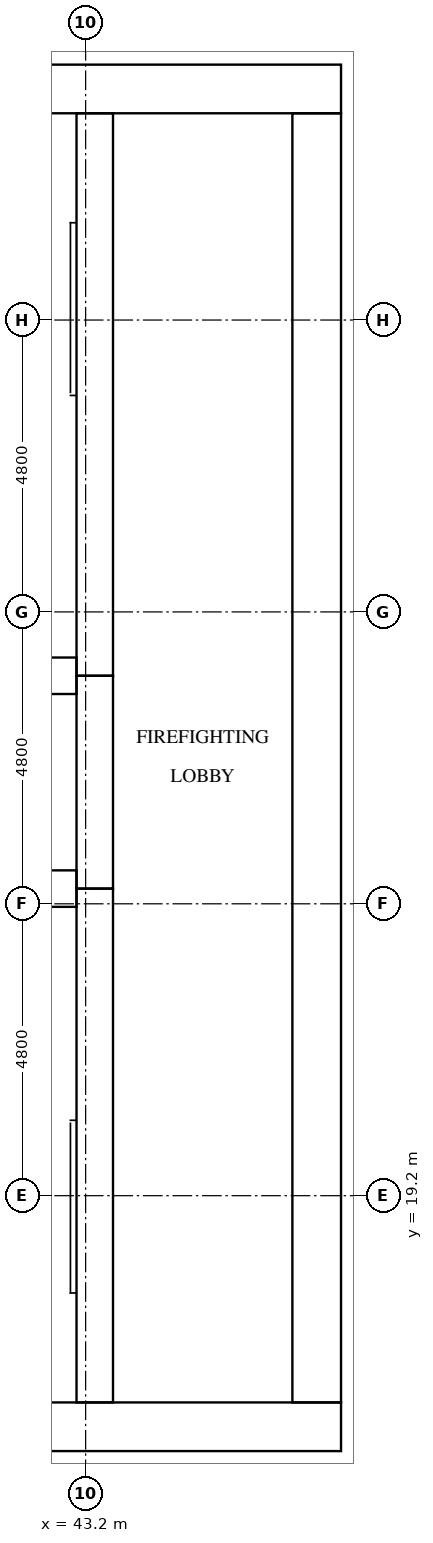
"""IFC4 building model, lengths in metres.
Left out: names, types, materials, properties, quantities, classifications, styles, units other than length and angle.
Written with IfcOpenShell. Run it as: python <this file> out.ifc"""

import sys

from ifc_helpers import new_model, si_unit, direction, frame, frame_2d, origin, place, context, subcontext, project, spatial, rectangle, extrude, element, fill, save


model = new_model("IFC4")
c1 = context("Model", 3, precision=1e-05, world=origin(), true_north=direction((0.0, 1.0)))
c2 = subcontext(c1, "Body", "Model", "MODEL_VIEW")
j1 = project(units=[si_unit("LENGTHUNIT", "METRE"), si_unit("PLANEANGLEUNIT", "RADIAN")], contexts=[c1])
p1 = place(None, origin())
s1 = spatial("IfcSite", under=j1, at=p1, CompositionType="ELEMENT")
p2 = place(p1, origin())
s2 = spatial("IfcBuilding", under=s1, at=p2, CompositionType="ELEMENT")
p3 = place(p2, frame((0.0, 0.0, 136.6)))
s3 = spatial("IfcBuildingStorey", under=s2, at=p3, CompositionType="ELEMENT", Elevation=136.6)
p4 = place(p3, frame((15.0, 15.4, 0.0), z_axis=(0.0, 0.0, 1.0), x_axis=(1.0, 0.0, 0.0)))
e1 = element("IfcWall", 1, at=p4, inside=s3, PredefinedType="SHEAR", context=c2, shape_type="SweptSolid", body=[
    extrude(rectangle(XDim=32.4, YDim=0.8, at=frame_2d((16.2, 0.0))), origin(), (0.0, 0.0, 1.0), 3.2),
])
p5 = place(p4, frame((15.3, 0.0, 0.0)))
e2 = element("IfcOpeningElement", 2, at=p5, cuts=e1, PredefinedType="OPENING", context=c2, shape_type="SweptSolid", body=[
    extrude(rectangle(XDim=1.8, YDim=2.1, at=frame_2d((0.9, 1.05))), frame((0.0, 0.41, 0.0), z_axis=(0.0, -1.0, 0.0), x_axis=(1.0, 0.0, 0.0)), (0.0, 0.0, 1.0), 0.82),
])
p6 = place(p3, frame((15.0, 37.4, 0.0), z_axis=(0.0, 0.0, 1.0), x_axis=(1.0, 0.0, 0.0)))
e3 = element("IfcWall", 3, at=p6, inside=s3, PredefinedType="SHEAR", context=c2, shape_type="SweptSolid", body=[
    extrude(rectangle(XDim=32.4, YDim=0.8, at=frame_2d((16.2, 0.0))), origin(), (0.0, 0.0, 1.0), 3.2),
])
p7 = place(p6, frame((15.3, 0.0, 0.0)))
e4 = element("IfcOpeningElement", 4, at=p7, cuts=e3, PredefinedType="OPENING", context=c2, shape_type="SweptSolid", body=[
    extrude(rectangle(XDim=1.8, YDim=2.1, at=frame_2d((0.9, 1.05))), frame((0.0, 0.41, 0.0), z_axis=(0.0, -1.0, 0.0), x_axis=(1.0, 0.0, 0.0)), (0.0, 0.0, 1.0), 0.82),
])
p8 = place(p6, frame((1.51, 0.0, 0.0)))
e5 = element("IfcOpeningElement", 5, at=p8, cuts=e3, PredefinedType="OPENING", context=c2, shape_type="SweptSolid", body=[
    extrude(rectangle(XDim=1.0, YDim=2.1, at=frame_2d((0.5, 1.05))), frame((0.0, 0.41, 0.0), z_axis=(0.0, -1.0, 0.0), x_axis=(1.0, 0.0, 0.0)), (0.0, 0.0, 1.0), 0.82),
])
p9 = place(p6, frame((5.11, 0.0, 0.0)))
e6 = element("IfcOpeningElement", 6, at=p9, cuts=e3, PredefinedType="OPENING", context=c2, shape_type="SweptSolid", body=[
    extrude(rectangle(XDim=1.0, YDim=2.1, at=frame_2d((0.5, 1.05))), frame((0.0, 0.41, 0.0), z_axis=(0.0, -1.0, 0.0), x_axis=(1.0, 0.0, 0.0)), (0.0, 0.0, 1.0), 0.82),
])
p10 = place(p3, frame((47.0, 15.8, 0.0), z_axis=(0.0, 0.0, 1.0), x_axis=(0.0, 1.0, 0.0)))
e7 = element("IfcWall", 7, at=p10, inside=s3, PredefinedType="SHEAR", context=c2, shape_type="SweptSolid", body=[
    extrude(rectangle(XDim=21.2, YDim=0.8, at=frame_2d((10.6, 0.0))), origin(), (0.0, 0.0, 1.0), 3.2),
])
p11 = place(p10, frame((10.3, 0.0, 0.0)))
e8 = element("IfcOpeningElement", 8, at=p11, cuts=e7, PredefinedType="OPENING", context=c2, shape_type="SweptSolid", body=[
    extrude(rectangle(XDim=1.2, YDim=2.1, at=frame_2d((0.6, 1.05))), frame((0.0, 0.41, 0.0), z_axis=(0.0, -1.0, 0.0), x_axis=(1.0, 0.0, 0.0)), (0.0, 0.0, 1.0), 0.82),
])
p12 = place(p3, frame((43.35, 15.8, 0.0), z_axis=(0.0, 0.0, 1.0), x_axis=(0.0, 1.0, 0.0)))
e9 = element("IfcWall", 9, at=p12, inside=s3, PredefinedType="SHEAR", context=c2, shape_type="SweptSolid", body=[
    extrude(rectangle(XDim=8.45, YDim=0.6, at=frame_2d((4.225, 0.0))), origin(), (0.0, 0.0, 1.0), 3.2),
])
p13 = place(p12, frame((0.4, 0.0, 0.0)))
e10 = element("IfcOpeningElement", 10, at=p13, cuts=e9, PredefinedType="OPENING", context=c2, shape_type="SweptSolid", body=[
    extrude(rectangle(XDim=1.2, YDim=2.1, at=frame_2d((0.6, 1.05))), frame((0.0, 0.31, 0.0), z_axis=(0.0, -1.0, 0.0), x_axis=(1.0, 0.0, 0.0)), (0.0, 0.0, 1.0), 0.62),
])
p14 = place(p3, frame((43.35, 24.25, 0.0), z_axis=(0.0, 0.0, 1.0), x_axis=(0.0, 1.0, 0.0)))
e11 = element("IfcWall", 11, at=p14, inside=s3, PredefinedType="SHEAR", context=c2, shape_type="SweptSolid", body=[
    extrude(rectangle(XDim=3.5, YDim=0.6, at=frame_2d((1.75, 0.0))), origin(), (0.0, 0.0, 1.0), 3.2),
])
p15 = place(p14, frame((1.2, 0.0, 0.0)))
e12 = element("IfcOpeningElement", 12, at=p15, cuts=e11, PredefinedType="OPENING", context=c2, shape_type="SweptSolid", body=[
    extrude(rectangle(XDim=1.1, YDim=2.1, at=frame_2d((0.55, 1.05))), frame((0.0, 0.31, 0.0), z_axis=(0.0, -1.0, 0.0), x_axis=(1.0, 0.0, 0.0)), (0.0, 0.0, 1.0), 0.62),
])
p16 = place(p3, frame((43.35, 27.75, 0.0), z_axis=(0.0, 0.0, 1.0), x_axis=(0.0, 1.0, 0.0)))
e13 = element("IfcWall", 13, at=p16, inside=s3, PredefinedType="SHEAR", context=c2, shape_type="SweptSolid", body=[
    extrude(rectangle(XDim=9.25, YDim=0.6, at=frame_2d((4.625, 0.0))), origin(), (0.0, 0.0, 1.0), 3.2),
])
p17 = place(p16, frame((7.65, 0.0, 0.0)))
e14 = element("IfcOpeningElement", 14, at=p17, cuts=e13, PredefinedType="OPENING", context=c2, shape_type="SweptSolid", body=[
    extrude(rectangle(XDim=1.2, YDim=2.1, at=frame_2d((0.6, 1.05))), frame((0.0, 0.31, 0.0), z_axis=(0.0, -1.0, 0.0), x_axis=(1.0, 0.0, 0.0)), (0.0, 0.0, 1.0), 0.62),
])
for number, where, z_axis, x_axis in (
    (15, (39.6, 24.25, 0.0), (0.0, 0.0, 1.0), (1.0, 0.0, 0.0)),
    (16, (39.6, 27.75, 0.0), (0.0, 0.0, 1.0), (1.0, 0.0, 0.0)),
):
    element("IfcWall", number, at=place(p3, frame(where, z_axis=z_axis, x_axis=x_axis)), inside=s3, PredefinedType="SHEAR", context=c2, shape_type="SweptSolid", body=[
        extrude(rectangle(XDim=3.45, YDim=0.6, at=frame_2d((1.725, 0.0))), origin(), (0.0, 0.0, 1.0), 3.2),
    ])
p18 = place(p15, origin())
e17 = element("IfcDoor", 17, at=p18, inside=s3, OperationType="DOUBLE_DOOR_SLIDING", PredefinedType="DOOR", context=c2, shape_type="SweptSolid", body=[
    extrude(rectangle(XDim=1.1, YDim=2.1, at=frame_2d((0.55, 1.05))), frame((0.0, 0.025, 0.0), z_axis=(0.0, -1.0, 0.0), x_axis=(1.0, 0.0, 0.0)), (0.0, 0.0, 1.0), 0.05),
])
fill(e12, e17)
p19 = place(p13, origin())
e18 = element("IfcDoor", 18, at=p19, inside=s3, OperationType="SINGLE_SWING_RIGHT", PredefinedType="DOOR", context=c2, shape_type="SweptSolid", body=[
    extrude(rectangle(XDim=1.2, YDim=2.1, at=frame_2d((0.6, 1.05))), frame((0.0, 0.025, 0.0), z_axis=(0.0, -1.0, 0.0), x_axis=(1.0, 0.0, 0.0)), (0.0, 0.0, 1.0), 0.05),
])
fill(e10, e18)
p20 = place(p17, origin())
e19 = element("IfcDoor", 19, at=p20, inside=s3, OperationType="SINGLE_SWING_LEFT", PredefinedType="DOOR", context=c2, shape_type="SweptSolid", body=[
    extrude(rectangle(XDim=1.2, YDim=2.1, at=frame_2d((0.6, 1.05))), frame((0.0, 0.025, 0.0), z_axis=(0.0, -1.0, 0.0), x_axis=(1.0, 0.0, 0.0)), (0.0, 0.0, 1.0), 0.05),
])
fill(e14, e19)
p21 = place(p11, origin())
e20 = element("IfcDoor", 20, at=p21, inside=s3, OperationType="SINGLE_SWING_LEFT", PredefinedType="DOOR", context=c2, shape_type="SweptSolid", body=[
    extrude(rectangle(XDim=1.2, YDim=2.1, at=frame_2d((0.6, 1.05))), frame((0.0, 0.025, 0.0), z_axis=(0.0, -1.0, 0.0), x_axis=(1.0, 0.0, 0.0)), (0.0, 0.0, 1.0), 0.05),
])
fill(e8, e20)
save(model, sys.argv[1])
